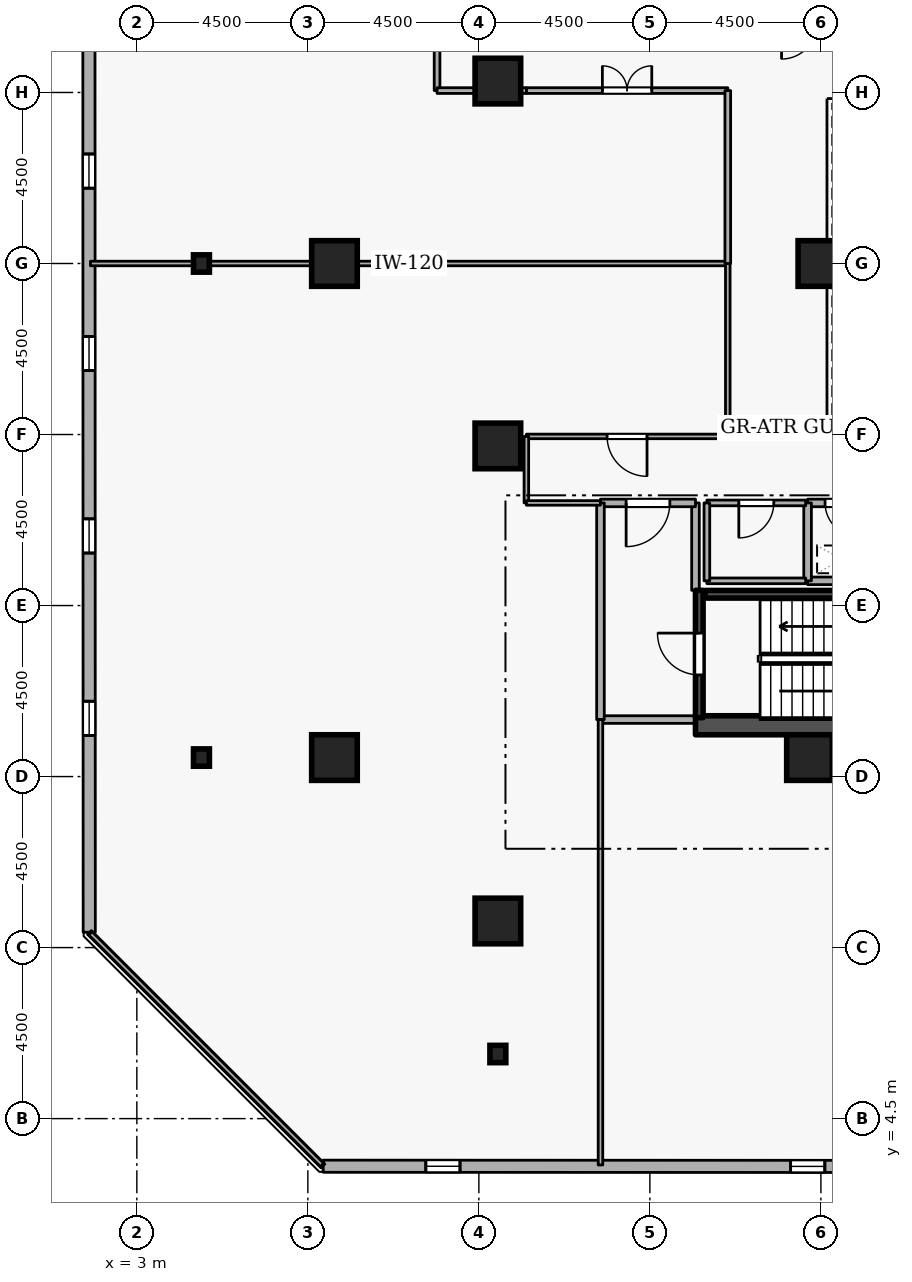
"""IFC4 building model, lengths in metres.
Left out: names, types, materials, properties, quantities, classifications, styles, units other than length and angle.
Written with IfcOpenShell. Run it as: python <this file> out.ifc"""

import sys

from ifc_helpers import new_model, si_unit, direction, frame, frame_2d, origin, origin_2d, place, context, subcontext, project, spatial, rectangle, i_section, extrude, element, fill, save


model = new_model("IFC4")
c1 = context("Model", 3, precision=1e-05, world=origin(), true_north=direction((0.0, 1.0)))
c2 = subcontext(c1, "Body", "Model", "MODEL_VIEW")
j1 = project(units=[si_unit("LENGTHUNIT", "METRE"), si_unit("PLANEANGLEUNIT", "RADIAN")], contexts=[c1])
p1 = place(None, origin())
s1 = spatial("IfcSite", under=j1, at=p1, CompositionType="ELEMENT")
p2 = place(p1, origin())
s2 = spatial("IfcBuilding", under=s1, at=p2, CompositionType="ELEMENT")
p3 = place(p2, frame((0.0, 0.0, 119.7)))
s3 = spatial("IfcBuildingStorey", under=s2, at=p3, CompositionType="ELEMENT", Elevation=119.7)
p4 = place(p3, frame((17.7, 14.85, 0.0), z_axis=(0.0, 0.0, 1.0), x_axis=(1.0, 0.0, 0.0)))
e1 = element("IfcWall", 1, at=p4, inside=s3, PredefinedType="SHEAR", context=c2, shape_type="SweptSolid", body=[
    extrude(rectangle(XDim=15.6, YDim=0.5, at=frame_2d((7.8, 0.0))), origin(), (0.0, 0.0, 1.0), 3.6),
])
for number, where, z_axis, x_axis in (
    (2, (12.5, 9.7, 0.0), (0.0, 0.0, 1.0), (1.0, 0.0, 0.0)),
    (3, (8.2, 14.0, 0.0), (0.0, 0.0, 1.0), (1.0, 0.0, 0.0)),
    (4, (8.2, 27.0, 0.0), (0.0, 0.0, 1.0), (1.0, 0.0, 0.0)),
    (5, (12.5, 22.2, 0.0), (0.0, 0.0, 1.0), (1.0, 0.0, 0.0)),
    (6, (12.5, 31.8, 0.0), (0.0, 0.0, 1.0), (1.0, 0.0, 0.0)),
    (7, (20.7, 14.0, 0.0), (0.0, 0.0, 1.0), (1.0, 0.0, 0.0)),
    (8, (21.0, 27.0, 0.0), (0.0, 0.0, 1.0), (1.0, 0.0, 0.0)),
):
    element("IfcColumn", number, at=place(p3, frame(where, z_axis=z_axis, x_axis=x_axis)), inside=s3, PredefinedType="COLUMN", context=c2, shape_type="SweptSolid", body=[
        extrude(rectangle(XDim=1.2, YDim=1.2, at=origin_2d()), origin(), (0.0, 0.0, 1.0), 3.6),
    ])
for number, where, z_axis, x_axis in (
    (9, (12.5, 6.2, 0.0), (0.0, 0.0, 1.0), (1.0, 0.0, 0.0)),
    (10, (4.7, 14.0, 0.0), (0.0, 0.0, 1.0), (1.0, 0.0, 0.0)),
    (11, (4.7, 27.0, 0.0), (0.0, 0.0, 1.0), (1.0, 0.0, 0.0)),
):
    element("IfcColumn", number, at=place(p3, frame(where, z_axis=z_axis, x_axis=x_axis)), inside=s3, PredefinedType="COLUMN", context=c2, shape_type="SweptSolid", body=[
        extrude(i_section(OverallWidth=0.418, OverallDepth=0.456, WebThickness=0.042, FlangeThickness=0.067, FilletRadius=0.015, at=origin_2d()), origin(), (0.0, 0.0, 1.0), 3.6),
    ])
p5 = place(p3, frame((7.904, 3.247, 0.0), z_axis=(0.0, 0.0, 1.0), x_axis=(0.999999933399, -0.000364968916, 0.0)))
e12 = element("IfcWall", 12, at=p5, inside=s3, PredefinedType="STANDARD", context=c2, shape_type="SweptSolid", body=[
    extrude(rectangle(XDim=32.778, YDim=0.32, at=frame_2d((16.389, 0.0))), origin(), (0.0, 0.0, 1.0), 2.7),
])
p6 = place(p5, frame((2.7, 0.0, 0.72)))
e13 = element("IfcOpeningElement", 13, at=p6, cuts=e12, PredefinedType="OPENING", context=c2, shape_type="SweptSolid", body=[
    extrude(rectangle(XDim=0.9, YDim=1.75, at=frame_2d((0.45, 0.875))), frame((0.0, 0.17, 0.0), z_axis=(0.0, -1.0, 0.0), x_axis=(1.0, 0.0, 0.0)), (0.0, 0.0, 1.0), 0.34),
])
p7 = place(p5, frame((12.3, 0.0, 0.72)))
e14 = element("IfcOpeningElement", 14, at=p7, cuts=e12, PredefinedType="OPENING", context=c2, shape_type="SweptSolid", body=[
    extrude(rectangle(XDim=0.9, YDim=1.75, at=frame_2d((0.45, 0.875))), frame((0.0, 0.17, 0.0), z_axis=(0.0, -1.0, 0.0), x_axis=(1.0, 0.0, 0.0)), (0.0, 0.0, 1.0), 0.34),
])
p8 = place(p5, frame((17.1, 0.0, 0.72)))
e15 = element("IfcOpeningElement", 15, at=p8, cuts=e12, PredefinedType="OPENING", context=c2, shape_type="SweptSolid", body=[
    extrude(rectangle(XDim=0.9, YDim=1.75, at=frame_2d((0.45, 0.875))), frame((0.0, 0.17, 0.0), z_axis=(0.0, -1.0, 0.0), x_axis=(1.0, 0.0, 0.0)), (0.0, 0.0, 1.0), 0.34),
])
p9 = place(p5, frame((21.9, 0.0, 0.72)))
e16 = element("IfcOpeningElement", 16, at=p9, cuts=e12, PredefinedType="OPENING", context=c2, shape_type="SweptSolid", body=[
    extrude(rectangle(XDim=0.9, YDim=1.75, at=frame_2d((0.45, 0.875))), frame((0.0, 0.17, 0.0), z_axis=(0.0, -1.0, 0.0), x_axis=(1.0, 0.0, 0.0)), (0.0, 0.0, 1.0), 0.34),
])
p10 = place(p5, frame((26.7, 0.0, 0.72)))
e17 = element("IfcOpeningElement", 17, at=p10, cuts=e12, PredefinedType="OPENING", context=c2, shape_type="SweptSolid", body=[
    extrude(rectangle(XDim=0.9, YDim=1.75, at=frame_2d((0.45, 0.875))), frame((0.0, 0.17, 0.0), z_axis=(0.0, -1.0, 0.0), x_axis=(1.0, 0.0, 0.0)), (0.0, 0.0, 1.0), 0.34),
])
p11 = place(p3, frame((1.735, 42.181, 0.0), z_axis=(0.0, 0.0, 1.0), x_axis=(0.000364968916, -0.999999933399, 0.0)))
e18 = element("IfcWall", 18, at=p11, inside=s3, PredefinedType="STANDARD", context=c2, shape_type="SweptSolid", body=[
    extrude(rectangle(XDim=32.778, YDim=0.32, at=frame_2d((16.389, 0.0))), origin(), (0.0, 0.0, 1.0), 2.7),
])
p12 = place(p11, frame((2.7, 0.0, 0.72)))
e19 = element("IfcOpeningElement", 19, at=p12, cuts=e18, PredefinedType="OPENING", context=c2, shape_type="SweptSolid", body=[
    extrude(rectangle(XDim=0.9, YDim=1.75, at=frame_2d((0.45, 0.875))), frame((0.0, 0.17, 0.0), z_axis=(0.0, -1.0, 0.0), x_axis=(1.0, 0.0, 0.0)), (0.0, 0.0, 1.0), 0.34),
])
p13 = place(p11, frame((7.5, 0.0, 0.72)))
e20 = element("IfcOpeningElement", 20, at=p13, cuts=e18, PredefinedType="OPENING", context=c2, shape_type="SweptSolid", body=[
    extrude(rectangle(XDim=0.9, YDim=1.75, at=frame_2d((0.45, 0.875))), frame((0.0, 0.17, 0.0), z_axis=(0.0, -1.0, 0.0), x_axis=(1.0, 0.0, 0.0)), (0.0, 0.0, 1.0), 0.34),
])
p14 = place(p11, frame((12.3, 0.0, 0.72)))
e21 = element("IfcOpeningElement", 21, at=p14, cuts=e18, PredefinedType="OPENING", context=c2, shape_type="SweptSolid", body=[
    extrude(rectangle(XDim=0.9, YDim=1.75, at=frame_2d((0.45, 0.875))), frame((0.0, 0.17, 0.0), z_axis=(0.0, -1.0, 0.0), x_axis=(1.0, 0.0, 0.0)), (0.0, 0.0, 1.0), 0.34),
])
p15 = place(p11, frame((17.1, 0.0, 0.72)))
e22 = element("IfcOpeningElement", 22, at=p15, cuts=e18, PredefinedType="OPENING", context=c2, shape_type="SweptSolid", body=[
    extrude(rectangle(XDim=0.9, YDim=1.75, at=frame_2d((0.45, 0.875))), frame((0.0, 0.17, 0.0), z_axis=(0.0, -1.0, 0.0), x_axis=(1.0, 0.0, 0.0)), (0.0, 0.0, 1.0), 0.34),
])
p16 = place(p11, frame((21.9, 0.0, 0.72)))
e23 = element("IfcOpeningElement", 23, at=p16, cuts=e18, PredefinedType="OPENING", context=c2, shape_type="SweptSolid", body=[
    extrude(rectangle(XDim=0.9, YDim=1.75, at=frame_2d((0.45, 0.875))), frame((0.0, 0.17, 0.0), z_axis=(0.0, -1.0, 0.0), x_axis=(1.0, 0.0, 0.0)), (0.0, 0.0, 1.0), 0.34),
])
p17 = place(p11, frame((26.7, 0.0, 0.72)))
e24 = element("IfcOpeningElement", 24, at=p17, cuts=e18, PredefinedType="OPENING", context=c2, shape_type="SweptSolid", body=[
    extrude(rectangle(XDim=0.9, YDim=1.75, at=frame_2d((0.45, 0.875))), frame((0.0, 0.17, 0.0), z_axis=(0.0, -1.0, 0.0), x_axis=(1.0, 0.0, 0.0)), (0.0, 0.0, 1.0), 0.34),
])
p18 = place(p3, frame((17.8, 15.05, 0.0), z_axis=(0.0, 0.0, 1.0), x_axis=(0.0, 1.0, 0.0)))
e25 = element("IfcWall", 25, at=p18, inside=s3, PredefinedType="SHEAR", context=c2, shape_type="SweptSolid", body=[
    extrude(rectangle(XDim=3.35, YDim=0.2, at=frame_2d((1.675, 0.0))), origin(), (0.0, 0.0, 1.0), 3.6),
])
p19 = place(p18, frame((1.125, 0.0, 0.0)))
e26 = element("IfcOpeningElement", 26, at=p19, cuts=e25, PredefinedType="OPENING", context=c2, shape_type="SweptSolid", body=[
    extrude(rectangle(XDim=1.1, YDim=2.1, at=frame_2d((0.55, 1.05))), frame((0.0, 0.11, 0.0), z_axis=(0.0, -1.0, 0.0), x_axis=(1.0, 0.0, 0.0)), (0.0, 0.0, 1.0), 0.22),
])
p20 = place(p3, frame((25.05, 18.297, 0.0), z_axis=(0.0, 0.0, 1.0), x_axis=(-1.0, 0.0, 0.0)))
e27 = element("IfcWall", 27, at=p20, inside=s3, PredefinedType="SHEAR", context=c2, shape_type="SweptSolid", body=[
    extrude(rectangle(XDim=7.1, YDim=0.2, at=frame_2d((3.55, 0.0))), origin(), (0.0, 0.0, 1.0), 3.6),
])
p21 = place(p3, frame((15.2, 15.0, 0.0), z_axis=(0.0, 0.0, 1.0), x_axis=(1.0, 0.0, 0.0)))
e28 = element("IfcWall", 28, at=p21, inside=s3, PredefinedType="STANDARD", context=c2, shape_type="SweptSolid", body=[
    extrude(rectangle(XDim=2.5, YDim=0.2, at=frame_2d((1.25, 0.0))), origin(), (0.0, 0.0, 1.0), 3.32),
])
p22 = place(p3, frame((17.7, 18.4, 0.0), z_axis=(0.0, 0.0, 1.0), x_axis=(0.0, 1.0, 0.0)))
e29 = element("IfcWall", 29, at=p22, inside=s3, PredefinedType="STANDARD", context=c2, shape_type="SweptSolid", body=[
    extrude(rectangle(XDim=2.3, YDim=0.2, at=frame_2d((1.15, 0.0))), origin(), (0.0, 0.0, 1.0), 2.525),
])
p23 = place(p3, frame((17.7, 20.7, 0.0), z_axis=(0.0, 0.0, 1.0), x_axis=(-1.0, 0.0, 0.0)))
e30 = element("IfcWall", 30, at=p23, inside=s3, PredefinedType="STANDARD", context=c2, shape_type="SweptSolid", body=[
    extrude(rectangle(XDim=2.5, YDim=0.2, at=frame_2d((1.25, 0.0))), origin(), (0.0, 0.0, 1.0), 3.32),
])
p24 = place(p23, frame((0.675, 0.0, 0.0)))
e31 = element("IfcOpeningElement", 31, at=p24, cuts=e30, PredefinedType="OPENING", context=c2, shape_type="SweptSolid", body=[
    extrude(rectangle(XDim=1.15, YDim=2.1, at=frame_2d((0.575, 1.05))), frame((0.0, 0.11, 0.0), z_axis=(0.0, -1.0, 0.0), x_axis=(1.0, 0.0, 0.0)), (0.0, 0.0, 1.0), 0.22),
])
p25 = place(p3, frame((15.2, 20.7, 0.0), z_axis=(0.0, 0.0, 1.0), x_axis=(0.0, -1.0, 0.0)))
e32 = element("IfcWall", 32, at=p25, inside=s3, PredefinedType="STANDARD", context=c2, shape_type="SweptSolid", body=[
    extrude(rectangle(XDim=5.7, YDim=0.2, at=frame_2d((2.85, 0.0))), origin(), (0.0, 0.0, 1.0), 3.32),
])
p26 = place(p3, frame((20.65, 18.65, 0.0), z_axis=(0.0, 0.0, 1.0), x_axis=(1.0, 0.0, 0.0)))
e33 = element("IfcWall", 33, at=p26, inside=s3, PredefinedType="STANDARD", context=c2, shape_type="SweptSolid", body=[
    extrude(rectangle(XDim=1.8, YDim=0.2, at=frame_2d((0.9, 0.0))), origin(), (0.0, 0.0, 1.0), 3.32),
])
p27 = place(p3, frame((22.45, 20.7, 0.0), z_axis=(0.0, 0.0, 1.0), x_axis=(-1.0, 0.0, 0.0)))
e34 = element("IfcWall", 34, at=p27, inside=s3, PredefinedType="STANDARD", context=c2, shape_type="SweptSolid", body=[
    extrude(rectangle(XDim=1.8, YDim=0.2, at=frame_2d((0.9, 0.0))), origin(), (0.0, 0.0, 1.0), 3.32),
])
p28 = place(p27, frame((0.46, 0.0, 0.0)))
e35 = element("IfcOpeningElement", 35, at=p28, cuts=e34, PredefinedType="OPENING", context=c2, shape_type="SweptSolid", body=[
    extrude(rectangle(XDim=0.88, YDim=2.04, at=frame_2d((0.44, 1.02))), frame((0.0, 0.11, 0.0), z_axis=(0.0, -1.0, 0.0), x_axis=(1.0, 0.0, 0.0)), (0.0, 0.0, 1.0), 0.22),
])
p29 = place(p3, frame((20.65, 20.7, 0.0), z_axis=(0.0, 0.0, 1.0), x_axis=(0.0, -1.0, 0.0)))
e36 = element("IfcWall", 36, at=p29, inside=s3, PredefinedType="STANDARD", context=c2, shape_type="SweptSolid", body=[
    extrude(rectangle(XDim=2.05, YDim=0.2, at=frame_2d((1.025, 0.0))), origin(), (0.0, 0.0, 1.0), 3.32),
])
p30 = place(p3, frame((18.0, 18.65, 0.0), z_axis=(0.0, 0.0, 1.0), x_axis=(1.0, 0.0, 0.0)))
e37 = element("IfcWall", 37, at=p30, inside=s3, PredefinedType="PARTITIONING", context=c2, shape_type="SweptSolid", body=[
    extrude(rectangle(XDim=2.6, YDim=0.15, at=frame_2d((1.3, 0.0))), origin(), (0.0, 0.0, 1.0), 3.32),
])
p31 = place(p3, frame((20.6, 20.7, 0.0), z_axis=(0.0, 0.0, 1.0), x_axis=(-1.0, 0.0, 0.0)))
e38 = element("IfcWall", 38, at=p31, inside=s3, PredefinedType="PARTITIONING", context=c2, shape_type="SweptSolid", body=[
    extrude(rectangle(XDim=2.6, YDim=0.15, at=frame_2d((1.3, 0.0))), origin(), (0.0, 0.0, 1.0), 3.32),
])
p32 = place(p31, frame((0.84, 0.0, 0.0)))
e39 = element("IfcOpeningElement", 39, at=p32, cuts=e38, PredefinedType="OPENING", context=c2, shape_type="SweptSolid", body=[
    extrude(rectangle(XDim=0.92, YDim=2.08, at=frame_2d((0.46, 1.04))), frame((0.0, 0.085, 0.0), z_axis=(0.0, -1.0, 0.0), x_axis=(1.0, 0.0, 0.0)), (0.0, 0.0, 1.0), 0.17),
])
p33 = place(p3, frame((18.0, 20.7, 0.0), z_axis=(0.0, 0.0, 1.0), x_axis=(0.0, -1.0, 0.0)))
e40 = element("IfcWall", 40, at=p33, inside=s3, PredefinedType="PARTITIONING", context=c2, shape_type="SweptSolid", body=[
    extrude(rectangle(XDim=2.05, YDim=0.15, at=frame_2d((1.025, 0.0))), origin(), (0.0, 0.0, 1.0), 2.525),
])
p34 = place(p3, frame((18.55, 22.45, 0.0), z_axis=(0.0, 0.0, 1.0), x_axis=(-1.0, 0.0, 0.0)))
e41 = element("IfcWall", 41, at=p34, inside=s3, PredefinedType="PARTITIONING", context=c2, shape_type="SweptSolid", body=[
    extrude(rectangle(XDim=5.3, YDim=0.12, at=frame_2d((2.65, 0.0))), origin(), (0.0, 0.0, 1.0), 3.32),
])
p35 = place(p34, frame((2.125, 0.0, 0.0)))
e42 = element("IfcOpeningElement", 42, at=p35, cuts=e41, PredefinedType="OPENING", context=c2, shape_type="SweptSolid", body=[
    extrude(rectangle(XDim=1.05, YDim=2.1, at=frame_2d((0.525, 1.05))), frame((0.0, 0.07, 0.0), z_axis=(0.0, -1.0, 0.0), x_axis=(1.0, 0.0, 0.0)), (0.0, 0.0, 1.0), 0.14),
])
p36 = place(p3, frame((13.25, 22.45, 0.0), z_axis=(0.0, 0.0, 1.0), x_axis=(0.0, -1.0, 0.0)))
e43 = element("IfcWall", 43, at=p36, inside=s3, PredefinedType="PARTITIONING", context=c2, shape_type="SweptSolid", body=[
    extrude(rectangle(XDim=1.75, YDim=0.12, at=frame_2d((0.875, 0.0))), origin(), (0.0, 0.0, 1.0), 3.32),
])
p37 = place(p3, frame((13.25, 20.7, 0.0), z_axis=(0.0, 0.0, 1.0), x_axis=(1.0, 0.0, 0.0)))
e44 = element("IfcWall", 44, at=p37, inside=s3, PredefinedType="PARTITIONING", context=c2, shape_type="SweptSolid", body=[
    extrude(rectangle(XDim=1.95, YDim=0.12, at=frame_2d((0.975, 0.0))), origin(), (0.0, 0.0, 1.0), 3.32),
])
p38 = place(p3, frame((15.2, 15.0, 0.0), z_axis=(0.0, 0.0, 1.0), x_axis=(0.0, -1.0, 0.0)))
e45 = element("IfcWall", 45, at=p38, inside=s3, PredefinedType="PARTITIONING", context=c2, shape_type="SweptSolid", body=[
    extrude(rectangle(XDim=11.72, YDim=0.12, at=frame_2d((5.86, 0.0))), origin(), (0.0, 0.0, 1.0), 3.32),
])
p39 = place(p3, frame((7.875, 3.28, 0.0), z_axis=(0.0, 0.0, 1.0), x_axis=(-0.707106781187, 0.707106781187, 0.0)))
e46 = element("IfcWall", 46, at=p39, inside=s3, PredefinedType="PARTITIONING", context=c2, shape_type="SweptSolid", body=[
    extrude(rectangle(XDim=8.619, YDim=0.12, at=frame_2d((4.31, 0.0))), origin(), (0.0, 0.0, 1.0), 3.32),
])
p40 = place(p3, frame((1.78, 27.0, 0.0), z_axis=(0.0, 0.0, 1.0), x_axis=(1.0, 0.0, 0.0)))
e47 = element("IfcWall", 47, at=p40, inside=s3, PredefinedType="PARTITIONING", context=c2, shape_type="SweptSolid", body=[
    extrude(rectangle(XDim=16.77, YDim=0.12, at=frame_2d((8.385, 0.0))), origin(), (0.0, 0.0, 1.0), 2.912),
])
p41 = place(p3, frame((18.55, 27.0, 0.0), z_axis=(0.0, 0.0, 1.0), x_axis=(0.0, -1.0, 0.0)))
e48 = element("IfcWall", 48, at=p41, inside=s3, PredefinedType="PARTITIONING", context=c2, shape_type="SweptSolid", body=[
    extrude(rectangle(XDim=4.55, YDim=0.12, at=frame_2d((2.275, 0.0))), origin(), (0.0, 0.0, 1.0), 3.32),
])
p42 = place(p3, frame((13.25, 31.55, 0.0), z_axis=(0.0, 0.0, 1.0), x_axis=(1.0, 0.0, 0.0)))
e49 = element("IfcWall", 49, at=p42, inside=s3, PredefinedType="PARTITIONING", context=c2, shape_type="SweptSolid", body=[
    extrude(rectangle(XDim=5.3, YDim=0.15, at=frame_2d((2.65, 0.0))), origin(), (0.0, 0.0, 1.0), 3.32),
])
p43 = place(p42, frame((2.0, 0.0, 0.0)))
e50 = element("IfcOpeningElement", 50, at=p43, cuts=e49, PredefinedType="OPENING", context=c2, shape_type="SweptSolid", body=[
    extrude(rectangle(XDim=1.3, YDim=2.12, at=frame_2d((0.65, 1.06))), frame((0.0, 0.085, 0.0), z_axis=(0.0, -1.0, 0.0), x_axis=(1.0, 0.0, 0.0)), (0.0, 0.0, 1.0), 0.17),
])
p44 = place(p3, frame((18.55, 31.55, 0.0), z_axis=(0.0, 0.0, 1.0), x_axis=(0.0, -1.0, 0.0)))
e51 = element("IfcWall", 51, at=p44, inside=s3, PredefinedType="PARTITIONING", context=c2, shape_type="SweptSolid", body=[
    extrude(rectangle(XDim=4.55, YDim=0.15, at=frame_2d((2.275, 0.0))), origin(), (0.0, 0.0, 1.0), 3.32),
])
p45 = place(p3, frame((10.9, 33.862, 0.0), z_axis=(0.0, 0.0, 1.0), x_axis=(0.0, -1.0, 0.0)))
e52 = element("IfcWall", 52, at=p45, inside=s3, PredefinedType="PARTITIONING", context=c2, shape_type="SweptSolid", body=[
    extrude(rectangle(XDim=2.312, YDim=0.15, at=frame_2d((1.156, 0.0))), origin(), (0.0, 0.0, 1.0), 3.32),
])
p46 = place(p3, frame((10.9, 31.55, 0.0), z_axis=(0.0, 0.0, 1.0), x_axis=(1.0, 0.0, 0.0)))
e53 = element("IfcWall", 53, at=p46, inside=s3, PredefinedType="PARTITIONING", context=c2, shape_type="SweptSolid", body=[
    extrude(rectangle(XDim=2.35, YDim=0.15, at=frame_2d((1.175, 0.0))), origin(), (0.0, 0.0, 1.0), 3.32),
])
p47 = place(p6, origin())
e54 = element("IfcWindow", 54, at=p47, inside=s3, PartitioningType="SINGLE_PANEL", PredefinedType="WINDOW", context=c2, shape_type="SweptSolid", body=[
    extrude(rectangle(XDim=0.9, YDim=1.75, at=frame_2d((0.45, 0.875))), frame((0.0, 0.03, 0.0), z_axis=(0.0, -1.0, 0.0), x_axis=(1.0, 0.0, 0.0)), (0.0, 0.0, 1.0), 0.06),
])
fill(e13, e54)
p48 = place(p7, origin())
e55 = element("IfcWindow", 55, at=p48, inside=s3, PartitioningType="SINGLE_PANEL", PredefinedType="WINDOW", context=c2, shape_type="SweptSolid", body=[
    extrude(rectangle(XDim=0.9, YDim=1.75, at=frame_2d((0.45, 0.875))), frame((0.0, 0.03, 0.0), z_axis=(0.0, -1.0, 0.0), x_axis=(1.0, 0.0, 0.0)), (0.0, 0.0, 1.0), 0.06),
])
fill(e14, e55)
p49 = place(p14, origin())
e56 = element("IfcWindow", 56, at=p49, inside=s3, PartitioningType="SINGLE_PANEL", PredefinedType="WINDOW", context=c2, shape_type="SweptSolid", body=[
    extrude(rectangle(XDim=0.9, YDim=1.75, at=frame_2d((0.45, 0.875))), frame((0.0, 0.03, 0.0), z_axis=(0.0, -1.0, 0.0), x_axis=(1.0, 0.0, 0.0)), (0.0, 0.0, 1.0), 0.06),
])
fill(e21, e56)
p50 = place(p15, origin())
e57 = element("IfcWindow", 57, at=p50, inside=s3, PartitioningType="SINGLE_PANEL", PredefinedType="WINDOW", context=c2, shape_type="SweptSolid", body=[
    extrude(rectangle(XDim=0.9, YDim=1.75, at=frame_2d((0.45, 0.875))), frame((0.0, 0.03, 0.0), z_axis=(0.0, -1.0, 0.0), x_axis=(1.0, 0.0, 0.0)), (0.0, 0.0, 1.0), 0.06),
])
fill(e22, e57)
p51 = place(p16, origin())
e58 = element("IfcWindow", 58, at=p51, inside=s3, PartitioningType="SINGLE_PANEL", PredefinedType="WINDOW", context=c2, shape_type="SweptSolid", body=[
    extrude(rectangle(XDim=0.9, YDim=1.75, at=frame_2d((0.45, 0.875))), frame((0.0, 0.03, 0.0), z_axis=(0.0, -1.0, 0.0), x_axis=(1.0, 0.0, 0.0)), (0.0, 0.0, 1.0), 0.06),
])
fill(e23, e58)
p52 = place(p17, origin())
e59 = element("IfcWindow", 59, at=p52, inside=s3, PartitioningType="SINGLE_PANEL", PredefinedType="WINDOW", context=c2, shape_type="SweptSolid", body=[
    extrude(rectangle(XDim=0.9, YDim=1.75, at=frame_2d((0.45, 0.875))), frame((0.0, 0.03, 0.0), z_axis=(0.0, -1.0, 0.0), x_axis=(1.0, 0.0, 0.0)), (0.0, 0.0, 1.0), 0.06),
])
fill(e24, e59)
p53 = place(p19, origin())
e60 = element("IfcDoor", 60, at=p53, inside=s3, OperationType="SINGLE_SWING_RIGHT", PredefinedType="DOOR", context=c2, shape_type="SweptSolid", body=[
    extrude(rectangle(XDim=1.1, YDim=2.1, at=frame_2d((0.55, 1.05))), frame((0.0, 0.025, 0.0), z_axis=(0.0, -1.0, 0.0), x_axis=(1.0, 0.0, 0.0)), (0.0, 0.0, 1.0), 0.05),
])
fill(e26, e60)
p54 = place(p24, origin())
e61 = element("IfcDoor", 61, at=p54, inside=s3, OperationType="SINGLE_SWING_RIGHT", PredefinedType="DOOR", context=c2, shape_type="SweptSolid", body=[
    extrude(rectangle(XDim=1.15, YDim=2.1, at=frame_2d((0.575, 1.05))), frame((0.0, 0.025, 0.0), z_axis=(0.0, -1.0, 0.0), x_axis=(1.0, 0.0, 0.0)), (0.0, 0.0, 1.0), 0.05),
])
fill(e31, e61)
p55 = place(p28, origin())
e62 = element("IfcDoor", 62, at=p55, inside=s3, OperationType="SINGLE_SWING_LEFT", PredefinedType="DOOR", context=c2, shape_type="SweptSolid", body=[
    extrude(rectangle(XDim=0.88, YDim=2.04, at=frame_2d((0.44, 1.02))), frame((0.0, 0.025, 0.0), z_axis=(0.0, -1.0, 0.0), x_axis=(1.0, 0.0, 0.0)), (0.0, 0.0, 1.0), 0.05),
])
fill(e35, e62)
p56 = place(p32, origin())
e63 = element("IfcDoor", 63, at=p56, inside=s3, OperationType="SINGLE_SWING_RIGHT", PredefinedType="DOOR", context=c2, shape_type="SweptSolid", body=[
    extrude(rectangle(XDim=0.92, YDim=2.08, at=frame_2d((0.46, 1.04))), frame((0.0, 0.025, 0.0), z_axis=(0.0, -1.0, 0.0), x_axis=(1.0, 0.0, 0.0)), (0.0, 0.0, 1.0), 0.05),
])
fill(e39, e63)
p57 = place(p35, origin())
e64 = element("IfcDoor", 64, at=p57, inside=s3, OperationType="SINGLE_SWING_LEFT", PredefinedType="DOOR", context=c2, shape_type="SweptSolid", body=[
    extrude(rectangle(XDim=1.05, YDim=2.1, at=frame_2d((0.525, 1.05))), frame((0.0, 0.025, 0.0), z_axis=(0.0, -1.0, 0.0), x_axis=(1.0, 0.0, 0.0)), (0.0, 0.0, 1.0), 0.05),
])
fill(e42, e64)
p58 = place(p43, origin())
e65 = element("IfcDoor", 65, at=p58, inside=s3, OperationType="DOUBLE_DOOR_SINGLE_SWING", PredefinedType="DOOR", context=c2, shape_type="SweptSolid", body=[
    extrude(rectangle(XDim=1.3, YDim=2.12, at=frame_2d((0.65, 1.06))), frame((0.0, 0.025, 0.0), z_axis=(0.0, -1.0, 0.0), x_axis=(1.0, 0.0, 0.0)), (0.0, 0.0, 1.0), 0.05),
])
fill(e50, e65)
save(model, sys.argv[1])
